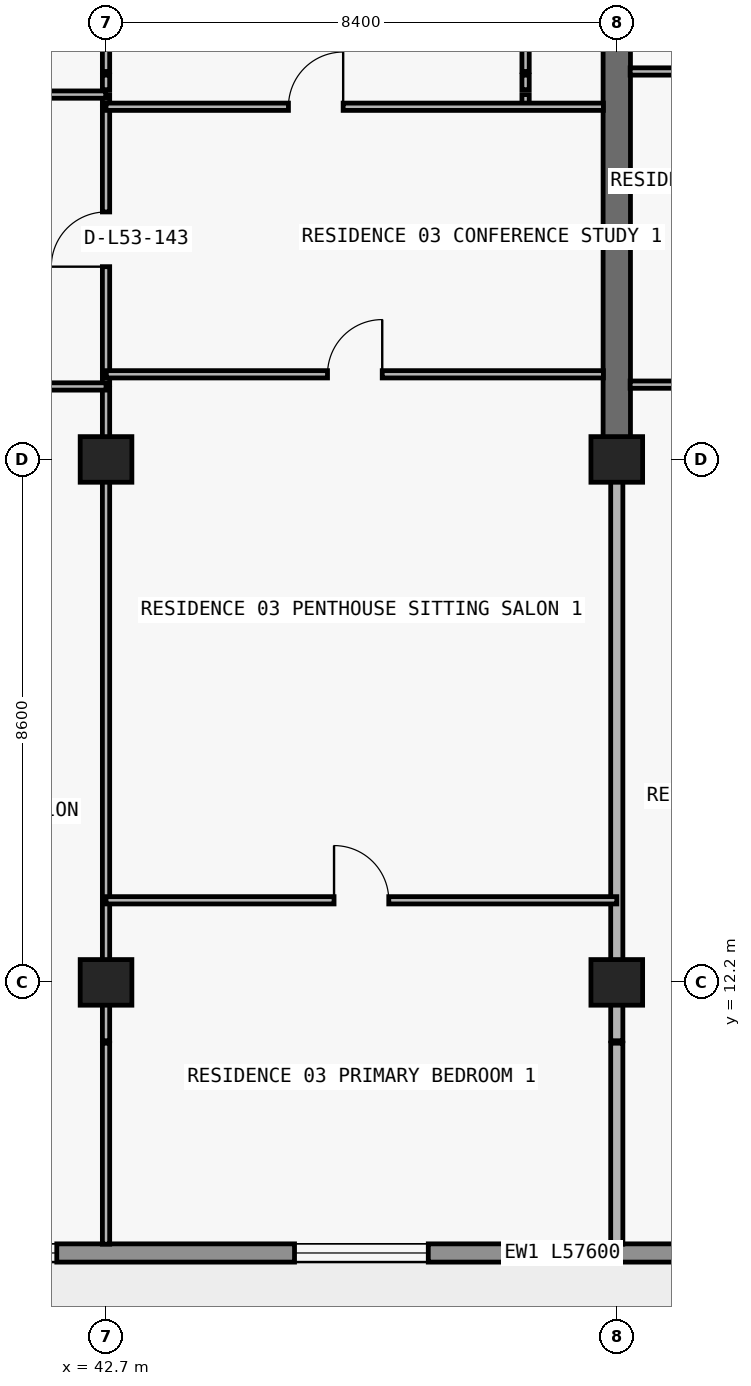
"""IFC4 building model, lengths in metres.
Left out: names, types, materials, properties, quantities, classifications, styles, units other than length and angle.
Written with IfcOpenShell. Run it as: python <this file> out.ifc"""

import sys

from ifc_helpers import new_model, si_unit, direction, frame, frame_2d, origin, origin_2d, place, context, subcontext, project, spatial, rectangle, extrude, element, fill, save


model = new_model("IFC4")
c1 = context("Model", 3, precision=1e-05, world=origin(), true_north=direction((0.0, 1.0)))
c2 = subcontext(c1, "Body", "Model", "MODEL_VIEW")
j1 = project(units=[si_unit("LENGTHUNIT", "METRE"), si_unit("PLANEANGLEUNIT", "RADIAN")], contexts=[c1])
p1 = place(None, origin())
s1 = spatial("IfcSite", under=j1, at=p1, CompositionType="ELEMENT")
p2 = place(p1, origin())
s2 = spatial("IfcBuilding", under=s1, at=p2, CompositionType="ELEMENT")
p3 = place(p2, frame((0.0, 0.0, 191.7)))
s3 = spatial("IfcBuildingStorey", under=s2, at=p3, CompositionType="ELEMENT", Elevation=191.7)
for number, where, z_axis, x_axis in (
    (1, (42.7, 12.2, 0.0), (0.0, 0.0, 1.0), (1.0, 0.0, 0.0)),
    (2, (51.1, 12.2, 0.0), (0.0, 0.0, 1.0), (1.0, 0.0, 0.0)),
    (3, (42.7, 20.8, 0.0), (0.0, 0.0, 1.0), (1.0, 0.0, 0.0)),
    (4, (51.1, 20.8, 0.0), (0.0, 0.0, 1.0), (1.0, 0.0, 0.0)),
):
    element("IfcColumn", number, at=place(p3, frame(where, z_axis=z_axis, x_axis=x_axis)), inside=s3, PredefinedType="COLUMN", context=c2, shape_type="SweptSolid", body=[
        extrude(rectangle(XDim=0.85, YDim=0.75, at=origin_2d()), origin(), (0.0, 0.0, 1.0), 3.05),
    ])
p4 = place(p3, frame((51.1, 20.8, 0.0), z_axis=(0.0, 0.0, 1.0), x_axis=(0.0, 1.0, 0.0)))
e5 = element("IfcWall", 5, at=p4, inside=s3, PredefinedType="SHEAR", context=c2, shape_type="SweptSolid", body=[
    extrude(rectangle(XDim=8.6, YDim=0.45, at=frame_2d((4.3, 0.0))), origin(), (0.0, 0.0, 1.0), 3.05),
])
p5 = place(p3, frame((67.7, 7.75, 0.0), z_axis=(0.0, 0.0, 1.0), x_axis=(-1.0, 0.0, 0.0)))
e6 = element("IfcWall", 6, at=p5, inside=s3, PredefinedType="STANDARD", context=c2, shape_type="SweptSolid", body=[
    extrude(rectangle(XDim=57.6, YDim=0.3, at=frame_2d((28.8, 0.0))), origin(), (0.0, 0.0, 1.0), 3.05),
])
p6 = place(p5, frame((54.69, 0.0, 0.0)))
e7 = element("IfcOpeningElement", 7, at=p6, cuts=e6, PredefinedType="OPENING", context=c2, shape_type="SweptSolid", body=[
    extrude(rectangle(XDim=2.0, YDim=2.3, at=frame_2d((1.0, 1.15))), frame((0.0, 0.16, 0.0), z_axis=(0.0, -1.0, 0.0), x_axis=(1.0, 0.0, 0.0)), (0.0, 0.0, 1.0), 0.32),
])
p7 = place(p5, frame((50.21, 0.0, 0.65)))
e8 = element("IfcOpeningElement", 8, at=p7, cuts=e6, PredefinedType="OPENING", context=c2, shape_type="SweptSolid", body=[
    extrude(rectangle(XDim=2.6, YDim=1.85, at=frame_2d((1.3, 0.925))), frame((0.0, 0.16, 0.0), z_axis=(0.0, -1.0, 0.0), x_axis=(1.0, 0.0, 0.0)), (0.0, 0.0, 1.0), 0.32),
])
p8 = place(p5, frame((44.1, 0.0, 0.85)))
e9 = element("IfcOpeningElement", 9, at=p8, cuts=e6, PredefinedType="OPENING", context=c2, shape_type="SweptSolid", body=[
    extrude(rectangle(XDim=2.2, YDim=1.55, at=frame_2d((1.1, 0.775))), frame((0.0, 0.16, 0.0), z_axis=(0.0, -1.0, 0.0), x_axis=(1.0, 0.0, 0.0)), (0.0, 0.0, 1.0), 0.32),
])
p9 = place(p5, frame((37.69, 0.0, 0.0)))
e10 = element("IfcOpeningElement", 10, at=p9, cuts=e6, PredefinedType="OPENING", context=c2, shape_type="SweptSolid", body=[
    extrude(rectangle(XDim=2.0, YDim=2.3, at=frame_2d((1.0, 1.15))), frame((0.0, 0.16, 0.0), z_axis=(0.0, -1.0, 0.0), x_axis=(1.0, 0.0, 0.0)), (0.0, 0.0, 1.0), 0.32),
])
p10 = place(p5, frame((33.59, 0.0, 0.85)))
e11 = element("IfcOpeningElement", 11, at=p10, cuts=e6, PredefinedType="OPENING", context=c2, shape_type="SweptSolid", body=[
    extrude(rectangle(XDim=1.8, YDim=1.55, at=frame_2d((0.9, 0.775))), frame((0.0, 0.16, 0.0), z_axis=(0.0, -1.0, 0.0), x_axis=(1.0, 0.0, 0.0)), (0.0, 0.0, 1.0), 0.32),
])
p11 = place(p5, frame((29.69, 0.0, 0.0)))
e12 = element("IfcOpeningElement", 12, at=p11, cuts=e6, PredefinedType="OPENING", context=c2, shape_type="SweptSolid", body=[
    extrude(rectangle(XDim=2.0, YDim=2.3, at=frame_2d((1.0, 1.15))), frame((0.0, 0.16, 0.0), z_axis=(0.0, -1.0, 0.0), x_axis=(1.0, 0.0, 0.0)), (0.0, 0.0, 1.0), 0.32),
])
p12 = place(p5, frame((25.81, 0.0, 0.65)))
e13 = element("IfcOpeningElement", 13, at=p12, cuts=e6, PredefinedType="OPENING", context=c2, shape_type="SweptSolid", body=[
    extrude(rectangle(XDim=2.6, YDim=1.85, at=frame_2d((1.3, 0.925))), frame((0.0, 0.16, 0.0), z_axis=(0.0, -1.0, 0.0), x_axis=(1.0, 0.0, 0.0)), (0.0, 0.0, 1.0), 0.32),
])
p13 = place(p5, frame((19.7, 0.0, 0.85)))
e14 = element("IfcOpeningElement", 14, at=p13, cuts=e6, PredefinedType="OPENING", context=c2, shape_type="SweptSolid", body=[
    extrude(rectangle(XDim=2.2, YDim=1.55, at=frame_2d((1.1, 0.775))), frame((0.0, 0.16, 0.0), z_axis=(0.0, -1.0, 0.0), x_axis=(1.0, 0.0, 0.0)), (0.0, 0.0, 1.0), 0.32),
])
p14 = place(p5, frame((13.29, 0.0, 0.0)))
e15 = element("IfcOpeningElement", 15, at=p14, cuts=e6, PredefinedType="OPENING", context=c2, shape_type="SweptSolid", body=[
    extrude(rectangle(XDim=2.0, YDim=2.3, at=frame_2d((1.0, 1.15))), frame((0.0, 0.16, 0.0), z_axis=(0.0, -1.0, 0.0), x_axis=(1.0, 0.0, 0.0)), (0.0, 0.0, 1.0), 0.32),
])
p15 = place(p5, frame((9.19, 0.0, 0.85)))
e16 = element("IfcOpeningElement", 16, at=p15, cuts=e6, PredefinedType="OPENING", context=c2, shape_type="SweptSolid", body=[
    extrude(rectangle(XDim=1.8, YDim=1.55, at=frame_2d((0.9, 0.775))), frame((0.0, 0.16, 0.0), z_axis=(0.0, -1.0, 0.0), x_axis=(1.0, 0.0, 0.0)), (0.0, 0.0, 1.0), 0.32),
])
p16 = place(p5, frame((5.273, 0.0, 0.0)))
e17 = element("IfcOpeningElement", 17, at=p16, cuts=e6, PredefinedType="OPENING", context=c2, shape_type="SweptSolid", body=[
    extrude(rectangle(XDim=2.0, YDim=2.3, at=frame_2d((1.0, 1.15))), frame((0.0, 0.16, 0.0), z_axis=(0.0, -1.0, 0.0), x_axis=(1.0, 0.0, 0.0)), (0.0, 0.0, 1.0), 0.32),
])
p17 = place(p5, frame((1.073, 0.0, 0.85)))
e18 = element("IfcOpeningElement", 18, at=p17, cuts=e6, PredefinedType="OPENING", context=c2, shape_type="SweptSolid", body=[
    extrude(rectangle(XDim=2.2, YDim=1.55, at=frame_2d((1.1, 0.775))), frame((0.0, 0.16, 0.0), z_axis=(0.0, -1.0, 0.0), x_axis=(1.0, 0.0, 0.0)), (0.0, 0.0, 1.0), 0.32),
])
p18 = place(p3, frame((42.7, 7.895, 0.0), z_axis=(0.0, 0.0, 1.0), x_axis=(0.0, 1.0, 0.0)))
e19 = element("IfcWall", 19, at=p18, inside=s3, PredefinedType="PARTITIONING", context=c2, shape_type="SweptSolid", body=[
    extrude(rectangle(XDim=3.305, YDim=0.12, at=frame_2d((1.652, 0.0))), origin(), (0.0, 0.0, 1.0), 3.05),
])
p19 = place(p3, frame((42.7, 11.24, 0.0), z_axis=(0.0, 0.0, 1.0), x_axis=(0.0, 1.0, 0.0)))
e20 = element("IfcWall", 20, at=p19, inside=s3, PredefinedType="PARTITIONING", context=c2, shape_type="SweptSolid", body=[
    extrude(rectangle(XDim=10.73, YDim=0.12, at=frame_2d((5.365, 0.0))), origin(), (0.0, 0.0, 1.0), 2.263),
])
p20 = place(p3, frame((42.7, 22.04, 0.0), z_axis=(0.0, 0.0, 1.0), x_axis=(0.0, 1.0, 0.0)))
e21 = element("IfcWall", 21, at=p20, inside=s3, PredefinedType="PARTITIONING", context=c2, shape_type="SweptSolid", body=[
    extrude(rectangle(XDim=0.16, YDim=0.12, at=frame_2d((0.08, 0.0))), origin(), (0.0, 0.0, 1.0), 2.263),
])
p21 = place(p3, frame((42.7, 22.24, 0.0), z_axis=(0.0, 0.0, 1.0), x_axis=(0.0, 1.0, 0.0)))
e22 = element("IfcWall", 22, at=p21, inside=s3, PredefinedType="PARTITIONING", context=c2, shape_type="SweptSolid", body=[
    extrude(rectangle(XDim=4.36, YDim=0.12, at=frame_2d((2.18, 0.0))), origin(), (0.0, 0.0, 1.0), 2.263),
])
p22 = place(p21, frame((1.73, 0.0, 0.0)))
e23 = element("IfcOpeningElement", 23, at=p22, cuts=e22, PredefinedType="OPENING", context=c2, shape_type="SweptSolid", body=[
    extrude(rectangle(XDim=0.9, YDim=2.15, at=frame_2d((0.45, 1.075))), frame((0.0, 0.07, 0.0), z_axis=(0.0, -1.0, 0.0), x_axis=(1.0, 0.0, 0.0)), (0.0, 0.0, 1.0), 0.14),
])
p23 = place(p3, frame((42.7, 26.64, 0.0), z_axis=(0.0, 0.0, 1.0), x_axis=(0.0, 1.0, 0.0)))
e24 = element("IfcWall", 24, at=p23, inside=s3, PredefinedType="PARTITIONING", context=c2, shape_type="SweptSolid", body=[
    extrude(rectangle(XDim=0.16, YDim=0.12, at=frame_2d((0.08, 0.0))), origin(), (0.0, 0.0, 1.0), 2.263),
])
p24 = place(p3, frame((42.7, 26.88, 0.0), z_axis=(0.0, 0.0, 1.0), x_axis=(0.0, 1.0, 0.0)))
e25 = element("IfcWall", 25, at=p24, inside=s3, PredefinedType="PARTITIONING", context=c2, shape_type="SweptSolid", body=[
    extrude(rectangle(XDim=0.24, YDim=0.12, at=frame_2d((0.12, 0.0))), origin(), (0.0, 0.0, 1.0), 2.263),
])
p25 = place(p3, frame((42.7, 27.18, 0.0), z_axis=(0.0, 0.0, 1.0), x_axis=(0.0, 1.0, 0.0)))
e26 = element("IfcWall", 26, at=p25, inside=s3, PredefinedType="PARTITIONING", context=c2, shape_type="SweptSolid", body=[
    extrude(rectangle(XDim=6.32, YDim=0.12, at=frame_2d((3.16, 0.0))), origin(), (0.0, 0.0, 1.0), 2.263),
])
p26 = place(p3, frame((49.6, 26.64, 0.0), z_axis=(0.0, 0.0, 1.0), x_axis=(0.0, 1.0, 0.0)))
e27 = element("IfcWall", 27, at=p26, inside=s3, PredefinedType="PARTITIONING", context=c2, shape_type="SweptSolid", body=[
    extrude(rectangle(XDim=0.16, YDim=0.12, at=frame_2d((0.08, 0.0))), origin(), (0.0, 0.0, 1.0), 3.05),
])
p27 = place(p3, frame((49.6, 26.88, 0.0), z_axis=(0.0, 0.0, 1.0), x_axis=(0.0, 1.0, 0.0)))
e28 = element("IfcWall", 28, at=p27, inside=s3, PredefinedType="PARTITIONING", context=c2, shape_type="SweptSolid", body=[
    extrude(rectangle(XDim=0.24, YDim=0.12, at=frame_2d((0.12, 0.0))), origin(), (0.0, 0.0, 1.0), 3.05),
])
p28 = place(p3, frame((49.6, 27.18, 0.0), z_axis=(0.0, 0.0, 1.0), x_axis=(0.0, 1.0, 0.0)))
e29 = element("IfcWall", 29, at=p28, inside=s3, PredefinedType="PARTITIONING", context=c2, shape_type="SweptSolid", body=[
    extrude(rectangle(XDim=6.32, YDim=0.12, at=frame_2d((3.16, 0.0))), origin(), (0.0, 0.0, 1.0), 3.05),
])
p29 = place(p28, frame((3.035, 0.0, 0.0)))
e30 = element("IfcOpeningElement", 30, at=p29, cuts=e29, PredefinedType="OPENING", context=c2, shape_type="SweptSolid", body=[
    extrude(rectangle(XDim=0.85, YDim=2.1, at=frame_2d((0.425, 1.05))), frame((0.0, 0.07, 0.0), z_axis=(0.0, -1.0, 0.0), x_axis=(1.0, 0.0, 0.0)), (0.0, 0.0, 1.0), 0.14),
])
p30 = place(p3, frame((51.1, 7.895, 0.0), z_axis=(0.0, 0.0, 1.0), x_axis=(0.0, 1.0, 0.0)))
e31 = element("IfcWall", 31, at=p30, inside=s3, PredefinedType="PARTITIONING", context=c2, shape_type="SweptSolid", body=[
    extrude(rectangle(XDim=3.305, YDim=0.2, at=frame_2d((1.652, 0.0))), origin(), (0.0, 0.0, 1.0), 3.05),
])
p31 = place(p3, frame((51.1, 11.24, 0.0), z_axis=(0.0, 0.0, 1.0), x_axis=(0.0, 1.0, 0.0)))
e32 = element("IfcWall", 32, at=p31, inside=s3, PredefinedType="PARTITIONING", context=c2, shape_type="SweptSolid", body=[
    extrude(rectangle(XDim=9.555, YDim=0.2, at=frame_2d((4.777, 0.0))), origin(), (0.0, 0.0, 1.0), 2.263),
])
p32 = place(p3, frame((42.7, 13.55, 0.0), z_axis=(0.0, 0.0, 1.0), x_axis=(1.0, 0.0, 0.0)))
e33 = element("IfcWall", 33, at=p32, inside=s3, PredefinedType="PARTITIONING", context=c2, shape_type="SweptSolid", body=[
    extrude(rectangle(XDim=8.4, YDim=0.12, at=frame_2d((4.2, 0.0))), origin(), (0.0, 0.0, 1.0), 3.05),
])
p33 = place(p32, frame((3.75, 0.0, 0.0)))
e34 = element("IfcOpeningElement", 34, at=p33, cuts=e33, PredefinedType="OPENING", context=c2, shape_type="SweptSolid", body=[
    extrude(rectangle(XDim=0.9, YDim=2.15, at=frame_2d((0.45, 1.075))), frame((0.0, 0.07, 0.0), z_axis=(0.0, -1.0, 0.0), x_axis=(1.0, 0.0, 0.0)), (0.0, 0.0, 1.0), 0.14),
])
p34 = place(p3, frame((35.105, 22.0, 0.0), z_axis=(0.0, 0.0, 1.0), x_axis=(1.0, 0.0, 0.0)))
e35 = element("IfcWall", 35, at=p34, inside=s3, PredefinedType="PARTITIONING", context=c2, shape_type="SweptSolid", body=[
    extrude(rectangle(XDim=7.595, YDim=0.12, at=frame_2d((3.797, 0.0))), origin(), (0.0, 0.0, 1.0), 3.05),
])
p35 = place(p34, frame((3.347, 0.0, 0.0)))
e36 = element("IfcOpeningElement", 36, at=p35, cuts=e35, PredefinedType="OPENING", context=c2, shape_type="SweptSolid", body=[
    extrude(rectangle(XDim=0.9, YDim=2.15, at=frame_2d((0.45, 1.075))), frame((0.0, 0.07, 0.0), z_axis=(0.0, -1.0, 0.0), x_axis=(1.0, 0.0, 0.0)), (0.0, 0.0, 1.0), 0.14),
])
p36 = place(p3, frame((51.32, 22.03, 0.0), z_axis=(0.0, 0.0, 1.0), x_axis=(1.0, 0.0, 0.0)))
e37 = element("IfcWall", 37, at=p36, inside=s3, PredefinedType="PARTITIONING", context=c2, shape_type="SweptSolid", body=[
    extrude(rectangle(XDim=8.18, YDim=0.12, at=frame_2d((4.09, 0.0))), origin(), (0.0, 0.0, 1.0), 3.05),
])
p37 = place(p36, frame((1.708, 0.0, 0.0)))
e38 = element("IfcOpeningElement", 38, at=p37, cuts=e37, PredefinedType="OPENING", context=c2, shape_type="SweptSolid", body=[
    extrude(rectangle(XDim=0.9, YDim=2.15, at=frame_2d((0.45, 1.075))), frame((0.0, 0.07, 0.0), z_axis=(0.0, -1.0, 0.0), x_axis=(1.0, 0.0, 0.0)), (0.0, 0.0, 1.0), 0.14),
])
p38 = place(p36, frame((5.84, 0.0, 0.0)))
e39 = element("IfcOpeningElement", 39, at=p38, cuts=e37, PredefinedType="OPENING", context=c2, shape_type="SweptSolid", body=[
    extrude(rectangle(XDim=0.9, YDim=2.15, at=frame_2d((0.45, 1.075))), frame((0.0, 0.07, 0.0), z_axis=(0.0, -1.0, 0.0), x_axis=(1.0, 0.0, 0.0)), (0.0, 0.0, 1.0), 0.14),
])
p39 = place(p3, frame((42.705, 22.2, 0.0), z_axis=(0.0, 0.0, 1.0), x_axis=(1.0, 0.0, 0.0)))
e40 = element("IfcWall", 40, at=p39, inside=s3, PredefinedType="PARTITIONING", context=c2, shape_type="SweptSolid", body=[
    extrude(rectangle(XDim=8.175, YDim=0.12, at=frame_2d((4.087, 0.0))), origin(), (0.0, 0.0, 1.0), 3.05),
])
p40 = place(p39, frame((3.637, 0.0, 0.0)))
e41 = element("IfcOpeningElement", 41, at=p40, cuts=e40, PredefinedType="OPENING", context=c2, shape_type="SweptSolid", body=[
    extrude(rectangle(XDim=0.9, YDim=2.15, at=frame_2d((0.45, 1.075))), frame((0.0, 0.07, 0.0), z_axis=(0.0, -1.0, 0.0), x_axis=(1.0, 0.0, 0.0)), (0.0, 0.0, 1.0), 0.14),
])
p41 = place(p3, frame((42.7, 26.6, 0.0), z_axis=(0.0, 0.0, 1.0), x_axis=(1.0, 0.0, 0.0)))
e42 = element("IfcWall", 42, at=p41, inside=s3, PredefinedType="PARTITIONING", context=c2, shape_type="SweptSolid", body=[
    extrude(rectangle(XDim=8.18, YDim=0.12, at=frame_2d((4.09, 0.0))), origin(), (0.0, 0.0, 1.0), 3.05),
])
p42 = place(p41, frame((3.0, 0.0, 0.0)))
e43 = element("IfcOpeningElement", 43, at=p42, cuts=e42, PredefinedType="OPENING", context=c2, shape_type="SweptSolid", body=[
    extrude(rectangle(XDim=0.9, YDim=2.15, at=frame_2d((0.45, 1.075))), frame((0.0, 0.07, 0.0), z_axis=(0.0, -1.0, 0.0), x_axis=(1.0, 0.0, 0.0)), (0.0, 0.0, 1.0), 0.14),
])
p43 = place(p3, frame((35.1, 26.8, 0.0), z_axis=(0.0, 0.0, 1.0), x_axis=(1.0, 0.0, 0.0)))
e44 = element("IfcWall", 44, at=p43, inside=s3, PredefinedType="PARTITIONING", context=c2, shape_type="SweptSolid", body=[
    extrude(rectangle(XDim=7.595, YDim=0.12, at=frame_2d((3.797, 0.0))), origin(), (0.0, 0.0, 1.0), 3.05),
])
p44 = place(p43, frame((2.582, 0.0, 0.0)))
e45 = element("IfcOpeningElement", 45, at=p44, cuts=e44, PredefinedType="OPENING", context=c2, shape_type="SweptSolid", body=[
    extrude(rectangle(XDim=0.9, YDim=2.15, at=frame_2d((0.45, 1.075))), frame((0.0, 0.07, 0.0), z_axis=(0.0, -1.0, 0.0), x_axis=(1.0, 0.0, 0.0)), (0.0, 0.0, 1.0), 0.14),
])
p45 = place(p3, frame((51.32, 27.18, 0.0), z_axis=(0.0, 0.0, 1.0), x_axis=(1.0, 0.0, 0.0)))
e46 = element("IfcWall", 46, at=p45, inside=s3, PredefinedType="PARTITIONING", context=c2, shape_type="SweptSolid", body=[
    extrude(rectangle(XDim=8.18, YDim=0.12, at=frame_2d((4.09, 0.0))), origin(), (0.0, 0.0, 1.0), 3.05),
])
p46 = place(p45, frame((1.708, 0.0, 0.0)))
e47 = element("IfcOpeningElement", 47, at=p46, cuts=e46, PredefinedType="OPENING", context=c2, shape_type="SweptSolid", body=[
    extrude(rectangle(XDim=0.9, YDim=2.15, at=frame_2d((0.45, 1.075))), frame((0.0, 0.07, 0.0), z_axis=(0.0, -1.0, 0.0), x_axis=(1.0, 0.0, 0.0)), (0.0, 0.0, 1.0), 0.14),
])
p47 = place(p12, origin())
e48 = element("IfcWindow", 48, at=p47, inside=s3, PartitioningType="SINGLE_PANEL", PredefinedType="WINDOW", context=c2, shape_type="SweptSolid", body=[
    extrude(rectangle(XDim=2.6, YDim=1.85, at=frame_2d((1.3, 0.925))), frame((0.0, 0.03, 0.0), z_axis=(0.0, -1.0, 0.0), x_axis=(1.0, 0.0, 0.0)), (0.0, 0.0, 1.0), 0.06),
])
fill(e13, e48)
p48 = place(p13, origin())
e49 = element("IfcWindow", 49, at=p48, inside=s3, PartitioningType="SINGLE_PANEL", PredefinedType="WINDOW", context=c2, shape_type="SweptSolid", body=[
    extrude(rectangle(XDim=2.2, YDim=1.55, at=frame_2d((1.1, 0.775))), frame((0.0, 0.03, 0.0), z_axis=(0.0, -1.0, 0.0), x_axis=(1.0, 0.0, 0.0)), (0.0, 0.0, 1.0), 0.06),
])
fill(e14, e49)
p49 = place(p22, origin())
e50 = element("IfcDoor", 50, at=p49, inside=s3, OperationType="SINGLE_SWING_LEFT", PredefinedType="DOOR", context=c2, shape_type="SweptSolid", body=[
    extrude(rectangle(XDim=0.9, YDim=2.15, at=frame_2d((0.45, 1.075))), frame((0.0, 0.025, 0.0), z_axis=(0.0, -1.0, 0.0), x_axis=(1.0, 0.0, 0.0)), (0.0, 0.0, 1.0), 0.05),
])
fill(e23, e50)
p50 = place(p42, origin())
e51 = element("IfcDoor", 51, at=p50, inside=s3, OperationType="SINGLE_SWING_RIGHT", PredefinedType="DOOR", context=c2, shape_type="SweptSolid", body=[
    extrude(rectangle(XDim=0.9, YDim=2.15, at=frame_2d((0.45, 1.075))), frame((0.0, 0.025, 0.0), z_axis=(0.0, -1.0, 0.0), x_axis=(1.0, 0.0, 0.0)), (0.0, 0.0, 1.0), 0.05),
])
fill(e43, e51)
p51 = place(p40, origin())
e52 = element("IfcDoor", 52, at=p51, inside=s3, OperationType="SINGLE_SWING_RIGHT", PredefinedType="DOOR", context=c2, shape_type="SweptSolid", body=[
    extrude(rectangle(XDim=0.9, YDim=2.15, at=frame_2d((0.45, 1.075))), frame((0.0, 0.025, 0.0), z_axis=(0.0, -1.0, 0.0), x_axis=(1.0, 0.0, 0.0)), (0.0, 0.0, 1.0), 0.05),
])
fill(e41, e52)
p52 = place(p33, origin())
e53 = element("IfcDoor", 53, at=p52, inside=s3, OperationType="SINGLE_SWING_LEFT", PredefinedType="DOOR", context=c2, shape_type="SweptSolid", body=[
    extrude(rectangle(XDim=0.9, YDim=2.15, at=frame_2d((0.45, 1.075))), frame((0.0, 0.025, 0.0), z_axis=(0.0, -1.0, 0.0), x_axis=(1.0, 0.0, 0.0)), (0.0, 0.0, 1.0), 0.05),
])
fill(e34, e53)
save(model, sys.argv[1])
